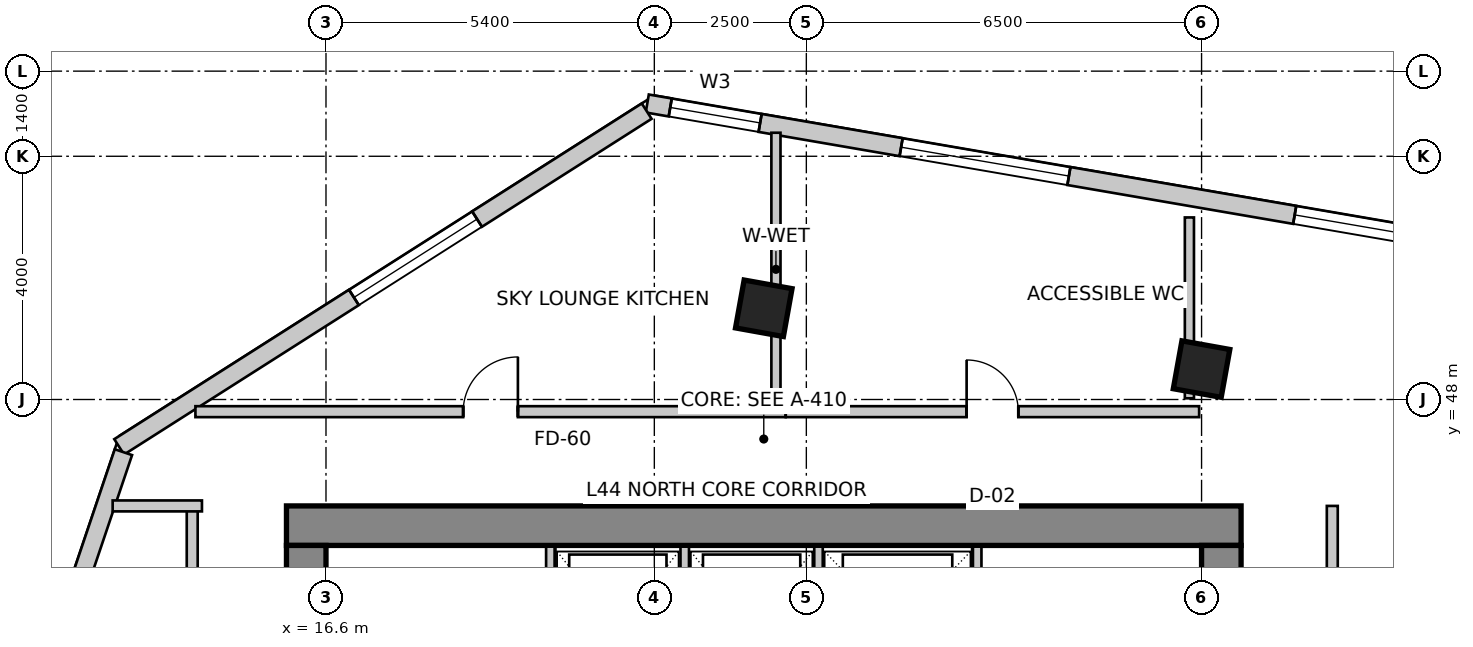
"""IFC4 building model, lengths in metres.
Left out: names, types, materials, properties, quantities, classifications, styles, units other than length and angle.
Written with IfcOpenShell. Run it as: python <this file> out.ifc"""

import sys

from ifc_helpers import new_model, si_unit, direction, frame, frame_2d, origin, origin_2d, place, context, subcontext, project, spatial, rectangle, extrude, source, transform, mapped, element, fill, save


model = new_model("IFC4")
c1 = context("Model", 3, precision=1e-05, world=origin(), true_north=direction((0.0, 1.0)))
c2 = subcontext(c1, "Body", "Model", "MODEL_VIEW")
j1 = project(units=[si_unit("LENGTHUNIT", "METRE"), si_unit("PLANEANGLEUNIT", "RADIAN")], contexts=[c1])
p1 = place(None, origin())
s1 = spatial("IfcSite", under=j1, at=p1, CompositionType="ELEMENT")
p2 = place(p1, origin())
s2 = spatial("IfcBuilding", under=s1, at=p2, CompositionType="ELEMENT")
p3 = place(p2, frame((0.0, 0.0, 178.2)))
s3 = spatial("IfcBuildingStorey", under=s2, at=p3, CompositionType="ELEMENT", Elevation=178.2)
p4 = place(p3, frame((15.95, 45.925, 0.0), z_axis=(0.0, 0.0, 1.0), x_axis=(1.0, 0.0, 0.0)))
e1 = element("IfcWall", 1, at=p4, inside=s3, PredefinedType="SHEAR", context=c2, shape_type="SweptSolid", body=[
    extrude(rectangle(XDim=15.7, YDim=0.65, at=frame_2d((7.85, 0.0))), origin(), (0.0, 0.0, 1.0), 5.2),
])
p5 = place(p3, frame((16.275, 34.2, 0.0), z_axis=(0.0, 0.0, 1.0), x_axis=(0.0, 1.0, 0.0)))
e2 = element("IfcWall", 2, at=p5, inside=s3, PredefinedType="SHEAR", context=c2, shape_type="SweptSolid", body=[
    extrude(rectangle(XDim=11.4, YDim=0.65, at=frame_2d((5.7, 0.0))), origin(), (0.0, 0.0, 1.0), 5.2),
])
m1 = source(origin(), c2, "Body", "SweptSolid", [
    extrude(rectangle(XDim=1.1, YDim=2.15, at=frame_2d((0.55, 1.075))), frame((0.0, 0.335, 0.0), z_axis=(0.0, -1.0, 0.0), x_axis=(1.0, 0.0, 0.0)), (0.0, 0.0, 1.0), 0.67),
])
p6 = place(p5, frame((7.15, 0.0, 0.0)))
e3 = element("IfcOpeningElement", 3, at=p6, cuts=e2, PredefinedType="OPENING", context=c2, shape_type="MappedRepresentation", body=[
    mapped(m1, transform((0.0, 0.0, 0.0), scale=1.0)),
])
p7 = place(p3, frame((31.325, 34.2, 0.0), z_axis=(0.0, 0.0, 1.0), x_axis=(0.0, 1.0, 0.0)))
e4 = element("IfcWall", 4, at=p7, inside=s3, PredefinedType="SHEAR", context=c2, shape_type="SweptSolid", body=[
    extrude(rectangle(XDim=11.4, YDim=0.65, at=frame_2d((5.7, 0.0))), origin(), (0.0, 0.0, 1.0), 5.2),
])
p8 = place(p7, frame((7.35, 0.0, 0.0)))
e5 = element("IfcOpeningElement", 5, at=p8, cuts=e4, PredefinedType="OPENING", context=c2, shape_type="MappedRepresentation", body=[
    mapped(m1, transform((0.0, 0.0, 0.0), scale=1.0)),
])
m2 = source(origin(), c2, "Body", "SweptSolid", [
    extrude(rectangle(XDim=0.8, YDim=0.8, at=origin_2d()), origin(), (0.0, 0.0, 1.0), 5.2),
])
for number, where, z_axis, x_axis in (
    (6, (23.8, 49.5, 0.0), (0.0, 0.0, 1.0), (0.984, -0.177, 0.0)),
    (7, (31.0, 48.5, 0.0), (0.0, 0.0, 1.0), (0.984, -0.177, 0.0)),
):
    element("IfcColumn", number, at=place(p3, frame(where, z_axis=z_axis, x_axis=x_axis)), inside=s3, PredefinedType="COLUMN", context=c2, shape_type="MappedRepresentation", body=[
        mapped(m2, transform((0.0, 0.0, 0.0), scale=1.0)),
    ])
p9 = place(p3, frame((48.361, 48.313, 0.0), z_axis=(0.0, 0.0, 1.0), x_axis=(-0.985523113069, 0.169541126597, 0.0)))
e8 = element("IfcWall", 8, at=p9, inside=s3, PredefinedType="SOLIDWALL", context=c2, shape_type="SweptSolid", body=[
    extrude(rectangle(XDim=26.866, YDim=0.3, at=frame_2d((13.433, 0.0))), origin(), (0.0, 0.0, 1.0), 4.95),
])
m3 = source(origin(), c2, "Body", "SweptSolid", [
    extrude(rectangle(XDim=2.8, YDim=2.4, at=frame_2d((1.4, 1.2))), frame((0.0, 0.16, 0.0), z_axis=(0.0, -1.0, 0.0), x_axis=(1.0, 0.0, 0.0)), (0.0, 0.0, 1.0), 0.32),
])
p10 = place(p9, frame((1.951, 0.0, 0.85)))
e9 = element("IfcOpeningElement", 9, at=p10, cuts=e8, PredefinedType="OPENING", context=c2, shape_type="MappedRepresentation", body=[
    mapped(m3, transform((0.0, 0.0, 0.0), scale=1.0)),
])
p11 = place(p9, frame((8.102, 0.0, 0.85)))
e10 = element("IfcOpeningElement", 10, at=p11, cuts=e8, PredefinedType="OPENING", context=c2, shape_type="MappedRepresentation", body=[
    mapped(m3, transform((0.0, 0.0, 0.0), scale=1.0)),
])
m4 = source(origin(), c2, "Body", "SweptSolid", [
    extrude(rectangle(XDim=2.4, YDim=2.2, at=frame_2d((1.2, 1.1))), frame((0.0, 0.16, 0.0), z_axis=(0.0, -1.0, 0.0), x_axis=(1.0, 0.0, 0.0)), (0.0, 0.0, 1.0), 0.32),
])
p12 = place(p9, frame((13.662, 0.0, 0.85)))
e11 = element("IfcOpeningElement", 11, at=p12, cuts=e8, PredefinedType="OPENING", context=c2, shape_type="MappedRepresentation", body=[
    mapped(m4, transform((0.0, 0.0, 0.0), scale=1.0)),
])
p13 = place(p9, frame((19.83, 0.0, 0.85)))
e12 = element("IfcOpeningElement", 12, at=p13, cuts=e8, PredefinedType="OPENING", context=c2, shape_type="MappedRepresentation", body=[
    mapped(m3, transform((0.0, 0.0, 0.0), scale=1.0)),
])
m5 = source(origin(), c2, "Body", "SweptSolid", [
    extrude(rectangle(XDim=1.5, YDim=1.8, at=frame_2d((0.75, 0.9))), frame((0.0, 0.16, 0.0), z_axis=(0.0, -1.0, 0.0), x_axis=(1.0, 0.0, 0.0)), (0.0, 0.0, 1.0), 0.32),
])
p14 = place(p9, frame((24.983, 0.0, 0.85)))
e13 = element("IfcOpeningElement", 13, at=p14, cuts=e8, PredefinedType="OPENING", context=c2, shape_type="MappedRepresentation", body=[
    mapped(m5, transform((0.0, 0.0, 0.0), scale=1.0)),
])
p15 = place(p3, frame((21.875, 52.742, 0.0), z_axis=(0.0, 0.0, 1.0), x_axis=(-0.843666375448, -0.536867811419, 0.0)))
e14 = element("IfcWall", 14, at=p15, inside=s3, PredefinedType="SOLIDWALL", context=c2, shape_type="SweptSolid", body=[
    extrude(rectangle(XDim=10.284, YDim=0.3, at=frame_2d((5.142, 0.0))), origin(), (0.0, 0.0, 1.0), 4.95),
])
p16 = place(p15, frame((3.307, 0.0, 0.85)))
e15 = element("IfcOpeningElement", 15, at=p16, cuts=e14, PredefinedType="OPENING", context=c2, shape_type="MappedRepresentation", body=[
    mapped(m4, transform((0.0, 0.0, 0.0), scale=1.0)),
])
p17 = place(p3, frame((13.269, 47.134, 0.0), z_axis=(0.0, 0.0, 1.0), x_axis=(-0.319920776449, -0.947444297464, 0.0)))
e16 = element("IfcWall", 16, at=p17, inside=s3, PredefinedType="SOLIDWALL", context=c2, shape_type="SweptSolid", body=[
    extrude(rectangle(XDim=16.133, YDim=0.3, at=frame_2d((8.067, 0.0))), origin(), (0.0, 0.0, 1.0), 4.95),
])
p18 = place(p17, frame((2.163, 0.0, 0.85)))
e17 = element("IfcOpeningElement", 17, at=p18, cuts=e16, PredefinedType="OPENING", context=c2, shape_type="MappedRepresentation", body=[
    mapped(m3, transform((0.0, 0.0, 0.0), scale=1.0)),
])
p19 = place(p17, frame((7.26, 0.0, 0.85)))
e18 = element("IfcOpeningElement", 18, at=p19, cuts=e16, PredefinedType="OPENING", context=c2, shape_type="MappedRepresentation", body=[
    mapped(m4, transform((0.0, 0.0, 0.0), scale=1.0)),
])
p20 = place(p17, frame((11.957, 0.0, 0.85)))
e19 = element("IfcOpeningElement", 19, at=p20, cuts=e16, PredefinedType="OPENING", context=c2, shape_type="MappedRepresentation", body=[
    mapped(m3, transform((0.0, 0.0, 0.0), scale=1.0)),
])
for number, where, z_axis, x_axis in (
    (20, (20.29, 43.28, 0.0), (0.0, 0.0, 1.0), (0.0, 1.0, 0.0)),
    (21, (27.31, 43.28, 0.0), (0.0, 0.0, 1.0), (0.0, 1.0, 0.0)),
):
    element("IfcWall", number, at=place(p3, frame(where, z_axis=z_axis, x_axis=x_axis)), inside=s3, PredefinedType="SOLIDWALL", context=c2, shape_type="SweptSolid", body=[
        extrude(rectangle(XDim=2.3, YDim=0.14, at=frame_2d((1.15, 0.0))), origin(), (0.0, 0.0, 1.0), 4.95),
    ])
for number, where, z_axis, x_axis in (
    (22, (22.5, 43.02, 0.0), (0.0, 0.0, 1.0), (0.0, 1.0, 0.0)),
    (23, (24.7, 43.02, 0.0), (0.0, 0.0, 1.0), (0.0, 1.0, 0.0)),
):
    element("IfcWall", number, at=place(p3, frame(where, z_axis=z_axis, x_axis=x_axis)), inside=s3, PredefinedType="SOLIDWALL", context=c2, shape_type="SweptSolid", body=[
        extrude(rectangle(XDim=2.56, YDim=0.14, at=frame_2d((1.28, 0.0))), origin(), (0.0, 0.0, 1.0), 4.95),
    ])
p21 = place(p3, frame((14.4, 33.644, 0.0), z_axis=(0.0, 0.0, 1.0), x_axis=(0.0, 1.0, 0.0)))
e24 = element("IfcWall", 24, at=p21, inside=s3, PredefinedType="PARTITIONING", context=c2, shape_type="SweptSolid", body=[
    extrude(rectangle(XDim=12.606, YDim=0.18, at=frame_2d((6.303, 0.0))), origin(), (0.0, 0.0, 1.0), 4.95),
])
m6 = source(origin(), c2, "Body", "SweptSolid", [
    extrude(rectangle(XDim=0.9, YDim=2.15, at=frame_2d((0.45, 1.075))), frame((0.0, 0.1, 0.0), z_axis=(0.0, -1.0, 0.0), x_axis=(1.0, 0.0, 0.0)), (0.0, 0.0, 1.0), 0.2),
])
p22 = place(p21, frame((4.399, 0.0, 0.0)))
e25 = element("IfcOpeningElement", 25, at=p22, cuts=e24, PredefinedType="OPENING", context=c2, shape_type="MappedRepresentation", body=[
    mapped(m6, transform((0.0, 0.0, 0.0), scale=1.0)),
])
p23 = place(p3, frame((14.56, 46.25, 0.0), z_axis=(0.0, 0.0, 1.0), x_axis=(-1.0, 0.0, 0.0)))
e26 = element("IfcWall", 26, at=p23, inside=s3, PredefinedType="PARTITIONING", context=c2, shape_type="SweptSolid", body=[
    extrude(rectangle(XDim=1.469, YDim=0.18, at=frame_2d((0.734, 0.0))), origin(), (0.0, 0.0, 1.0), 4.95),
])
p24 = place(p3, frame((14.453, 47.8, 0.0), z_axis=(0.0, 0.0, 1.0), x_axis=(1.0, 0.0, 0.0)))
e27 = element("IfcWall", 27, at=p24, inside=s3, PredefinedType="PARTITIONING", context=c2, shape_type="SweptSolid", body=[
    extrude(rectangle(XDim=9.707, YDim=0.18, at=frame_2d((4.854, 0.0))), origin(), (0.0, 0.0, 1.0), 4.634),
])
p25 = place(p24, frame((4.404, 0.0, 0.0)))
e28 = element("IfcOpeningElement", 28, at=p25, cuts=e27, PredefinedType="OPENING", context=c2, shape_type="MappedRepresentation", body=[
    mapped(m6, transform((0.0, 0.0, 0.0), scale=1.0)),
])
p26 = place(p3, frame((24.162, 47.8, 0.0), z_axis=(0.0, 0.0, 1.0), x_axis=(1.0, 0.0, 0.0)))
e29 = element("IfcWall", 29, at=p26, inside=s3, PredefinedType="PARTITIONING", context=c2, shape_type="SweptSolid", body=[
    extrude(rectangle(XDim=6.798, YDim=0.18, at=frame_2d((3.399, 0.0))), origin(), (0.0, 0.0, 1.0), 4.522),
])
m7 = source(origin(), c2, "Body", "SweptSolid", [
    extrude(rectangle(XDim=0.85, YDim=2.15, at=frame_2d((0.425, 1.075))), frame((0.0, 0.1, 0.0), z_axis=(0.0, -1.0, 0.0), x_axis=(1.0, 0.0, 0.0)), (0.0, 0.0, 1.0), 0.2),
])
p27 = place(p26, frame((2.974, 0.0, 0.0)))
e30 = element("IfcOpeningElement", 30, at=p27, cuts=e29, PredefinedType="OPENING", context=c2, shape_type="MappedRepresentation", body=[
    mapped(m7, transform((0.0, 0.0, 0.0), scale=1.0)),
])
p28 = place(p3, frame((33.15, 46.25, 0.0), z_axis=(0.0, 0.0, 1.0), x_axis=(0.0, -1.0, 0.0)))
e31 = element("IfcWall", 31, at=p28, inside=s3, PredefinedType="PARTITIONING", context=c2, shape_type="SweptSolid", body=[
    extrude(rectangle(XDim=10.05, YDim=0.18, at=frame_2d((5.025, 0.0))), origin(), (0.0, 0.0, 1.0), 4.522),
])
m8 = source(origin(), c2, "Body", "SweptSolid", [
    extrude(rectangle(XDim=1.6, YDim=2.15, at=frame_2d((0.8, 1.075))), frame((0.0, 0.1, 0.0), z_axis=(0.0, -1.0, 0.0), x_axis=(1.0, 0.0, 0.0)), (0.0, 0.0, 1.0), 0.2),
])
p29 = place(p28, frame((4.164, 0.0, 0.0)))
e32 = element("IfcOpeningElement", 32, at=p29, cuts=e31, PredefinedType="OPENING", context=c2, shape_type="MappedRepresentation", body=[
    mapped(m8, transform((0.0, 0.0, 0.0), scale=1.0)),
])
p30 = place(p3, frame((24.0, 52.387, 0.0), z_axis=(0.0, 0.0, 1.0), x_axis=(0.0, -1.0, 0.0)))
e33 = element("IfcWall", 33, at=p30, inside=s3, PredefinedType="PARTITIONING", context=c2, shape_type="SweptSolid", body=[
    extrude(rectangle(XDim=4.493, YDim=0.15, at=frame_2d((2.247, 0.0))), origin(), (0.0, 0.0, 1.0), 4.242),
])
p31 = place(p3, frame((30.8, 50.994, 0.0), z_axis=(0.0, 0.0, 1.0), x_axis=(0.0, -1.0, 0.0)))
e34 = element("IfcWall", 34, at=p31, inside=s3, PredefinedType="PARTITIONING", context=c2, shape_type="SweptSolid", body=[
    extrude(rectangle(XDim=2.974, YDim=0.15, at=frame_2d((1.487, 0.0))), origin(), (0.0, 0.0, 1.0), 4.242),
])
m9 = source(origin(), c2, "Body", "SweptSolid", [
    extrude(rectangle(XDim=2.4, YDim=2.2, at=frame_2d((1.2, 1.1))), frame((0.0, -0.015, 0.0), z_axis=(0.0, -1.0, 0.0), x_axis=(1.0, 0.0, 0.0)), (0.0, 0.0, 1.0), 0.06),
])
p32 = place(p12, origin())
e35 = element("IfcWindow", 35, at=p32, inside=s3, PartitioningType="SINGLE_PANEL", PredefinedType="WINDOW", context=c2, shape_type="MappedRepresentation", body=[
    mapped(m9, transform((0.0, 0.0, 0.0), scale=1.0)),
])
fill(e11, e35)
m10 = source(origin(), c2, "Body", "SweptSolid", [
    extrude(rectangle(XDim=2.8, YDim=2.4, at=frame_2d((1.4, 1.2))), frame((0.0, -0.015, 0.0), z_axis=(0.0, -1.0, 0.0), x_axis=(1.0, 0.0, 0.0)), (0.0, 0.0, 1.0), 0.06),
])
p33 = place(p13, origin())
e36 = element("IfcWindow", 36, at=p33, inside=s3, PartitioningType="SINGLE_PANEL", PredefinedType="WINDOW", context=c2, shape_type="MappedRepresentation", body=[
    mapped(m10, transform((0.0, 0.0, 0.0), scale=1.0)),
])
fill(e12, e36)
m11 = source(origin(), c2, "Body", "SweptSolid", [
    extrude(rectangle(XDim=1.5, YDim=1.8, at=frame_2d((0.75, 0.9))), frame((0.0, -0.015, 0.0), z_axis=(0.0, -1.0, 0.0), x_axis=(1.0, 0.0, 0.0)), (0.0, 0.0, 1.0), 0.06),
])
p34 = place(p14, origin())
e37 = element("IfcWindow", 37, at=p34, inside=s3, PartitioningType="SINGLE_PANEL", PredefinedType="WINDOW", context=c2, shape_type="MappedRepresentation", body=[
    mapped(m11, transform((0.0, 0.0, 0.0), scale=1.0)),
])
fill(e13, e37)
p35 = place(p16, origin())
e38 = element("IfcWindow", 38, at=p35, inside=s3, PartitioningType="SINGLE_PANEL", PredefinedType="WINDOW", context=c2, shape_type="MappedRepresentation", body=[
    mapped(m9, transform((0.0, 0.0, 0.0), scale=1.0)),
])
fill(e15, e38)
m12 = source(origin(), c2, "Body", "SweptSolid", [
    extrude(rectangle(XDim=0.9, YDim=2.15, at=frame_2d((0.45, 1.075))), frame((0.0, 0.025, 0.0), z_axis=(0.0, -1.0, 0.0), x_axis=(1.0, 0.0, 0.0)), (0.0, 0.0, 1.0), 0.05),
])
p36 = place(p25, origin())
e39 = element("IfcDoor", 39, at=p36, inside=s3, OperationType="SINGLE_SWING_RIGHT", PredefinedType="DOOR", context=c2, shape_type="MappedRepresentation", body=[
    mapped(m12, transform((0.0, 0.0, 0.0), scale=1.0)),
])
fill(e28, e39)
m13 = source(origin(), c2, "Body", "SweptSolid", [
    extrude(rectangle(XDim=0.85, YDim=2.15, at=frame_2d((0.425, 1.075))), frame((0.0, 0.025, 0.0), z_axis=(0.0, -1.0, 0.0), x_axis=(1.0, 0.0, 0.0)), (0.0, 0.0, 1.0), 0.05),
])
p37 = place(p27, origin())
e40 = element("IfcDoor", 40, at=p37, inside=s3, OperationType="SINGLE_SWING_LEFT", PredefinedType="DOOR", context=c2, shape_type="MappedRepresentation", body=[
    mapped(m13, transform((0.0, 0.0, 0.0), scale=1.0)),
])
fill(e30, e40)
save(model, sys.argv[1])
